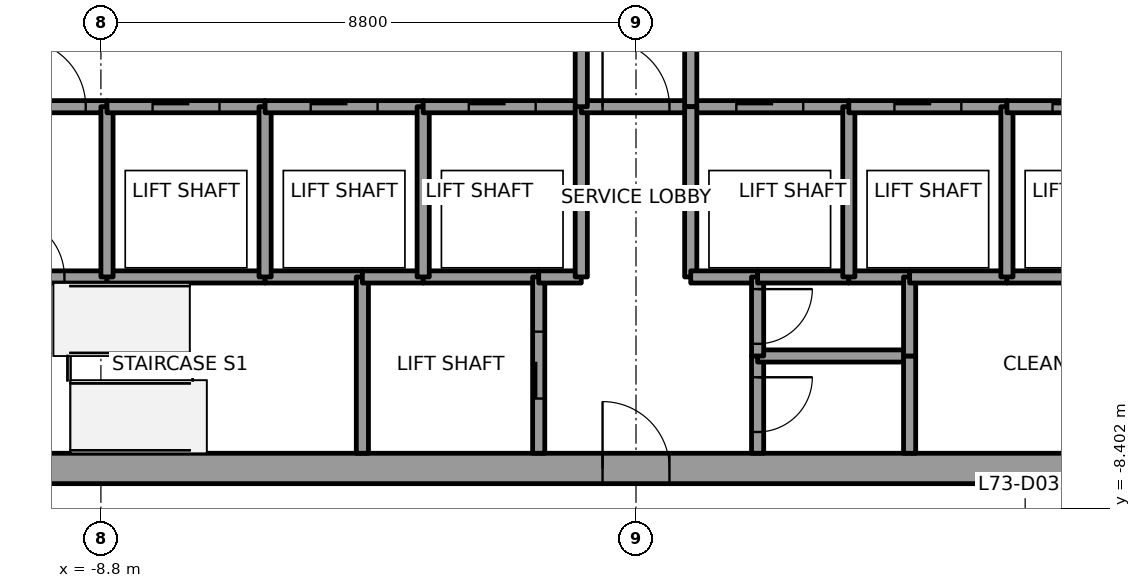
"""IFC4 building model, lengths in metres.
Left out: names, types, materials, properties, quantities, classifications, styles, units other than length and angle.
Written with IfcOpenShell. Run it as: python <this file> out.ifc"""

import sys

from ifc_helpers import new_model, si_unit, direction, frame, frame_2d, origin, place, context, subcontext, project, spatial, rectangle, extrude, element, fill, save


model = new_model("IFC4")
c1 = context("Model", 3, precision=1e-05, world=origin(), true_north=direction((0.0, 1.0)))
c2 = subcontext(c1, "Body", "Model", "MODEL_VIEW")
j1 = project(units=[si_unit("LENGTHUNIT", "METRE"), si_unit("PLANEANGLEUNIT", "RADIAN")], contexts=[c1])
p1 = place(None, origin())
s1 = spatial("IfcSite", under=j1, at=p1, CompositionType="ELEMENT")
p2 = place(p1, origin())
s2 = spatial("IfcBuilding", under=s1, at=p2, CompositionType="ELEMENT")
p3 = place(p2, frame((0.0, 0.0, 319.0)))
s3 = spatial("IfcBuildingStorey", under=s2, at=p3, CompositionType="ELEMENT", Elevation=319.0)
p4 = place(p3, frame((-11.0, -7.75, 0.0), z_axis=(0.0, 0.0, 1.0), x_axis=(1.0, 0.0, 0.0)))
e1 = element("IfcWall", 1, at=p4, inside=s3, PredefinedType="SHEAR", context=c2, shape_type="SweptSolid", body=[
    extrude(rectangle(XDim=22.0, YDim=0.5, at=frame_2d((11.0, 0.0))), origin(), (0.0, 0.0, 1.0), 5.4),
])
p5 = place(p4, frame((10.45, 0.0, 0.0)))
e2 = element("IfcOpeningElement", 2, at=p5, cuts=e1, PredefinedType="OPENING", context=c2, shape_type="SweptSolid", body=[
    extrude(rectangle(XDim=1.1, YDim=2.1, at=frame_2d((0.55, 1.05))), frame((0.0, 0.25, 0.0), z_axis=(0.0, -1.0, 0.0), x_axis=(1.0, 0.0, 0.0)), (0.0, 0.0, 1.0), 0.5),
])
p6 = place(p3, frame((-10.5, -4.6, 0.0), z_axis=(0.0, 0.0, 1.0), x_axis=(1.0, 0.0, 0.0)))
e3 = element("IfcWall", 3, at=p6, inside=s3, PredefinedType="SOLIDWALL", context=c2, shape_type="SweptSolid", body=[
    extrude(rectangle(XDim=1.8, YDim=0.2, at=frame_2d((0.9, 0.0))), origin(), (0.0, 0.0, 1.0), 5.25),
])
p7 = place(p6, frame((0.1, 0.0, 0.0)))
e4 = element("IfcOpeningElement", 4, at=p7, cuts=e3, PredefinedType="OPENING", context=c2, shape_type="SweptSolid", body=[
    extrude(rectangle(XDim=1.0, YDim=2.1, at=frame_2d((0.5, 1.05))), frame((0.0, 0.1, 0.0), z_axis=(0.0, -1.0, 0.0), x_axis=(1.0, 0.0, 0.0)), (0.0, 0.0, 1.0), 0.2),
])
p8 = place(p3, frame((-10.5, -1.8, 0.0), z_axis=(0.0, 0.0, 1.0), x_axis=(1.0, 0.0, 0.0)))
e5 = element("IfcWall", 5, at=p8, inside=s3, PredefinedType="SOLIDWALL", context=c2, shape_type="SweptSolid", body=[
    extrude(rectangle(XDim=1.8, YDim=0.2, at=frame_2d((0.9, 0.0))), origin(), (0.0, 0.0, 1.0), 5.25),
])
p9 = place(p8, frame((0.35, 0.0, 0.0)))
e6 = element("IfcOpeningElement", 6, at=p9, cuts=e5, PredefinedType="OPENING", context=c2, shape_type="SweptSolid", body=[
    extrude(rectangle(XDim=1.1, YDim=2.1, at=frame_2d((0.55, 1.05))), frame((0.0, 0.1, 0.0), z_axis=(0.0, -1.0, 0.0), x_axis=(1.0, 0.0, 0.0)), (0.0, 0.0, 1.0), 0.2),
])
p10 = place(p3, frame((-8.7, -4.6, 0.0), z_axis=(0.0, 0.0, 1.0), x_axis=(1.0, 0.0, 0.0)))
e7 = element("IfcWall", 7, at=p10, inside=s3, PredefinedType="SOLIDWALL", context=c2, shape_type="SweptSolid", body=[
    extrude(rectangle(XDim=2.6, YDim=0.2, at=frame_2d((1.3, 0.0))), origin(), (0.0, 0.0, 1.0), 5.25),
])
p11 = place(p3, frame((-8.7, -4.6, 0.0), z_axis=(0.0, 0.0, 1.0), x_axis=(0.0, 1.0, 0.0)))
e8 = element("IfcWall", 8, at=p11, inside=s3, PredefinedType="SOLIDWALL", context=c2, shape_type="SweptSolid", body=[
    extrude(rectangle(XDim=2.8, YDim=0.2, at=frame_2d((1.4, 0.0))), origin(), (0.0, 0.0, 1.0), 5.25),
])
p12 = place(p3, frame((-8.7, -1.8, 0.0), z_axis=(0.0, 0.0, 1.0), x_axis=(1.0, 0.0, 0.0)))
e9 = element("IfcWall", 9, at=p12, inside=s3, PredefinedType="SOLIDWALL", context=c2, shape_type="SweptSolid", body=[
    extrude(rectangle(XDim=2.6, YDim=0.2, at=frame_2d((1.3, 0.0))), origin(), (0.0, 0.0, 1.0), 5.25),
])
p13 = place(p12, frame((0.75, 0.0, 0.0)))
e10 = element("IfcOpeningElement", 10, at=p13, cuts=e9, PredefinedType="OPENING", context=c2, shape_type="SweptSolid", body=[
    extrude(rectangle(XDim=1.1, YDim=2.1, at=frame_2d((0.55, 1.05))), frame((0.0, 0.1, 0.0), z_axis=(0.0, -1.0, 0.0), x_axis=(1.0, 0.0, 0.0)), (0.0, 0.0, 1.0), 0.2),
])
p14 = place(p3, frame((-6.1, -4.6, 0.0), z_axis=(0.0, 0.0, 1.0), x_axis=(1.0, 0.0, 0.0)))
e11 = element("IfcWall", 11, at=p14, inside=s3, PredefinedType="SOLIDWALL", context=c2, shape_type="SweptSolid", body=[
    extrude(rectangle(XDim=1.6, YDim=0.2, at=frame_2d((0.8, 0.0))), origin(), (0.0, 0.0, 1.0), 5.25),
])
p15 = place(p3, frame((-6.1, -4.6, 0.0), z_axis=(0.0, 0.0, 1.0), x_axis=(0.0, 1.0, 0.0)))
e12 = element("IfcWall", 12, at=p15, inside=s3, PredefinedType="SOLIDWALL", context=c2, shape_type="SweptSolid", body=[
    extrude(rectangle(XDim=2.8, YDim=0.2, at=frame_2d((1.4, 0.0))), origin(), (0.0, 0.0, 1.0), 5.25),
])
p16 = place(p3, frame((-6.1, -1.8, 0.0), z_axis=(0.0, 0.0, 1.0), x_axis=(1.0, 0.0, 0.0)))
e13 = element("IfcWall", 13, at=p16, inside=s3, PredefinedType="SOLIDWALL", context=c2, shape_type="SweptSolid", body=[
    extrude(rectangle(XDim=2.6, YDim=0.2, at=frame_2d((1.3, 0.0))), origin(), (0.0, 0.0, 1.0), 5.25),
])
p17 = place(p16, frame((0.75, 0.0, 0.0)))
e14 = element("IfcOpeningElement", 14, at=p17, cuts=e13, PredefinedType="OPENING", context=c2, shape_type="SweptSolid", body=[
    extrude(rectangle(XDim=1.1, YDim=2.1, at=frame_2d((0.55, 1.05))), frame((0.0, 0.1, 0.0), z_axis=(0.0, -1.0, 0.0), x_axis=(1.0, 0.0, 0.0)), (0.0, 0.0, 1.0), 0.2),
])
p18 = place(p3, frame((-4.5, -4.6, 0.0), z_axis=(0.0, 0.0, 1.0), x_axis=(0.0, -1.0, 0.0)))
e15 = element("IfcWall", 15, at=p18, inside=s3, PredefinedType="SOLIDWALL", context=c2, shape_type="SweptSolid", body=[
    extrude(rectangle(XDim=2.9, YDim=0.2, at=frame_2d((1.45, 0.0))), origin(), (0.0, 0.0, 1.0), 5.25),
])
p19 = place(p3, frame((-4.5, -4.6, 0.0), z_axis=(0.0, 0.0, 1.0), x_axis=(1.0, 0.0, 0.0)))
e16 = element("IfcWall", 16, at=p19, inside=s3, PredefinedType="SOLIDWALL", context=c2, shape_type="SweptSolid", body=[
    extrude(rectangle(XDim=1.0, YDim=0.2, at=frame_2d((0.5, 0.0))), origin(), (0.0, 0.0, 1.0), 5.25),
])
p20 = place(p3, frame((-3.5, -4.6, 0.0), z_axis=(0.0, 0.0, 1.0), x_axis=(1.0, 0.0, 0.0)))
e17 = element("IfcWall", 17, at=p20, inside=s3, PredefinedType="SOLIDWALL", context=c2, shape_type="SweptSolid", body=[
    extrude(rectangle(XDim=1.9, YDim=0.2, at=frame_2d((0.95, 0.0))), origin(), (0.0, 0.0, 1.0), 5.25),
])
p21 = place(p3, frame((-3.5, -4.6, 0.0), z_axis=(0.0, 0.0, 1.0), x_axis=(0.0, 1.0, 0.0)))
e18 = element("IfcWall", 18, at=p21, inside=s3, PredefinedType="SOLIDWALL", context=c2, shape_type="SweptSolid", body=[
    extrude(rectangle(XDim=2.8, YDim=0.2, at=frame_2d((1.4, 0.0))), origin(), (0.0, 0.0, 1.0), 5.25),
])
p22 = place(p3, frame((-3.5, -1.8, 0.0), z_axis=(0.0, 0.0, 1.0), x_axis=(1.0, 0.0, 0.0)))
e19 = element("IfcWall", 19, at=p22, inside=s3, PredefinedType="SOLIDWALL", context=c2, shape_type="SweptSolid", body=[
    extrude(rectangle(XDim=2.6, YDim=0.2, at=frame_2d((1.3, 0.0))), origin(), (0.0, 0.0, 1.0), 5.25),
])
p23 = place(p22, frame((0.75, 0.0, 0.0)))
e20 = element("IfcOpeningElement", 20, at=p23, cuts=e19, PredefinedType="OPENING", context=c2, shape_type="SweptSolid", body=[
    extrude(rectangle(XDim=1.1, YDim=2.1, at=frame_2d((0.55, 1.05))), frame((0.0, 0.1, 0.0), z_axis=(0.0, -1.0, 0.0), x_axis=(1.0, 0.0, 0.0)), (0.0, 0.0, 1.0), 0.2),
])
p24 = place(p3, frame((-1.6, -7.5, 0.0), z_axis=(0.0, 0.0, 1.0), x_axis=(0.0, 1.0, 0.0)))
e21 = element("IfcWall", 21, at=p24, inside=s3, PredefinedType="SOLIDWALL", context=c2, shape_type="SweptSolid", body=[
    extrude(rectangle(XDim=2.9, YDim=0.2, at=frame_2d((1.45, 0.0))), origin(), (0.0, 0.0, 1.0), 5.25),
])
p25 = place(p24, frame((0.9, 0.0, 0.0)))
e22 = element("IfcOpeningElement", 22, at=p25, cuts=e21, PredefinedType="OPENING", context=c2, shape_type="SweptSolid", body=[
    extrude(rectangle(XDim=1.1, YDim=2.1, at=frame_2d((0.55, 1.05))), frame((0.0, 0.1, 0.0), z_axis=(0.0, -1.0, 0.0), x_axis=(1.0, 0.0, 0.0)), (0.0, 0.0, 1.0), 0.2),
])
p26 = place(p3, frame((-1.6, -4.6, 0.0), z_axis=(0.0, 0.0, 1.0), x_axis=(1.0, 0.0, 0.0)))
e23 = element("IfcWall", 23, at=p26, inside=s3, PredefinedType="SOLIDWALL", context=c2, shape_type="SweptSolid", body=[
    extrude(rectangle(XDim=0.7, YDim=0.2, at=frame_2d((0.35, 0.0))), origin(), (0.0, 0.0, 1.0), 5.25),
])
p27 = place(p3, frame((-0.9, -4.6, 0.0), z_axis=(0.0, 0.0, 1.0), x_axis=(0.0, 1.0, 0.0)))
e24 = element("IfcWall", 24, at=p27, inside=s3, PredefinedType="SOLIDWALL", context=c2, shape_type="SweptSolid", body=[
    extrude(rectangle(XDim=2.8, YDim=0.2, at=frame_2d((1.4, 0.0))), origin(), (0.0, 0.0, 1.0), 5.25),
])
p28 = place(p3, frame((-0.9, -1.8, 0.0), z_axis=(0.0, 0.0, 1.0), x_axis=(1.0, 0.0, 0.0)))
e25 = element("IfcWall", 25, at=p28, inside=s3, PredefinedType="SOLIDWALL", context=c2, shape_type="SweptSolid", body=[
    extrude(rectangle(XDim=1.8, YDim=0.2, at=frame_2d((0.9, 0.0))), origin(), (0.0, 0.0, 1.0), 5.25),
])
p29 = place(p28, frame((0.35, 0.0, 0.0)))
e26 = element("IfcOpeningElement", 26, at=p29, cuts=e25, PredefinedType="OPENING", context=c2, shape_type="SweptSolid", body=[
    extrude(rectangle(XDim=1.1, YDim=2.1, at=frame_2d((0.55, 1.05))), frame((0.0, 0.1, 0.0), z_axis=(0.0, -1.0, 0.0), x_axis=(1.0, 0.0, 0.0)), (0.0, 0.0, 1.0), 0.2),
])
p30 = place(p3, frame((-0.9, 1.8, 0.0), z_axis=(0.0, 0.0, 1.0), x_axis=(0.0, -1.0, 0.0)))
e27 = element("IfcWall", 27, at=p30, inside=s3, PredefinedType="SOLIDWALL", context=c2, shape_type="SweptSolid", body=[
    extrude(rectangle(XDim=3.6, YDim=0.2, at=frame_2d((1.8, 0.0))), origin(), (0.0, 0.0, 1.0), 5.25),
])
p31 = place(p30, frame((1.05, 0.0, 0.0)))
e28 = element("IfcOpeningElement", 28, at=p31, cuts=e27, PredefinedType="OPENING", context=c2, shape_type="SweptSolid", body=[
    extrude(rectangle(XDim=1.5, YDim=2.1, at=frame_2d((0.75, 1.05))), frame((0.0, 0.1, 0.0), z_axis=(0.0, -1.0, 0.0), x_axis=(1.0, 0.0, 0.0)), (0.0, 0.0, 1.0), 0.2),
])
p32 = place(p3, frame((0.9, -1.8, 0.0), z_axis=(0.0, 0.0, 1.0), x_axis=(1.0, 0.0, 0.0)))
e29 = element("IfcWall", 29, at=p32, inside=s3, PredefinedType="SOLIDWALL", context=c2, shape_type="SweptSolid", body=[
    extrude(rectangle(XDim=2.6, YDim=0.2, at=frame_2d((1.3, 0.0))), origin(), (0.0, 0.0, 1.0), 5.25),
])
p33 = place(p32, frame((0.75, 0.0, 0.0)))
e30 = element("IfcOpeningElement", 30, at=p33, cuts=e29, PredefinedType="OPENING", context=c2, shape_type="SweptSolid", body=[
    extrude(rectangle(XDim=1.1, YDim=2.1, at=frame_2d((0.55, 1.05))), frame((0.0, 0.1, 0.0), z_axis=(0.0, -1.0, 0.0), x_axis=(1.0, 0.0, 0.0)), (0.0, 0.0, 1.0), 0.2),
])
p34 = place(p3, frame((0.9, -1.8, 0.0), z_axis=(0.0, 0.0, 1.0), x_axis=(0.0, 1.0, 0.0)))
e31 = element("IfcWall", 31, at=p34, inside=s3, PredefinedType="SOLIDWALL", context=c2, shape_type="SweptSolid", body=[
    extrude(rectangle(XDim=3.6, YDim=0.2, at=frame_2d((1.8, 0.0))), origin(), (0.0, 0.0, 1.0), 5.25),
])
p35 = place(p34, frame((1.05, 0.0, 0.0)))
e32 = element("IfcOpeningElement", 32, at=p35, cuts=e31, PredefinedType="OPENING", context=c2, shape_type="SweptSolid", body=[
    extrude(rectangle(XDim=1.5, YDim=2.1, at=frame_2d((0.75, 1.05))), frame((0.0, 0.1, 0.0), z_axis=(0.0, -1.0, 0.0), x_axis=(1.0, 0.0, 0.0)), (0.0, 0.0, 1.0), 0.2),
])
p36 = place(p3, frame((0.9, -1.8, 0.0), z_axis=(0.0, 0.0, 1.0), x_axis=(0.0, -1.0, 0.0)))
e33 = element("IfcWall", 33, at=p36, inside=s3, PredefinedType="SOLIDWALL", context=c2, shape_type="SweptSolid", body=[
    extrude(rectangle(XDim=2.8, YDim=0.2, at=frame_2d((1.4, 0.0))), origin(), (0.0, 0.0, 1.0), 5.25),
])
p37 = place(p3, frame((0.9, -4.6, 0.0), z_axis=(0.0, 0.0, 1.0), x_axis=(1.0, 0.0, 0.0)))
e34 = element("IfcWall", 34, at=p37, inside=s3, PredefinedType="SOLIDWALL", context=c2, shape_type="SweptSolid", body=[
    extrude(rectangle(XDim=1.1, YDim=0.2, at=frame_2d((0.55, 0.0))), origin(), (0.0, 0.0, 1.0), 5.25),
])
p38 = place(p3, frame((2.0, -5.9, 0.0), z_axis=(0.0, 0.0, 1.0), x_axis=(0.0, -1.0, 0.0)))
e35 = element("IfcWall", 35, at=p38, inside=s3, PredefinedType="SOLIDWALL", context=c2, shape_type="SweptSolid", body=[
    extrude(rectangle(XDim=1.6, YDim=0.2, at=frame_2d((0.8, 0.0))), origin(), (0.0, 0.0, 1.0), 5.25),
])
p39 = place(p38, frame((0.35, 0.0, 0.0)))
e36 = element("IfcOpeningElement", 36, at=p39, cuts=e35, PredefinedType="OPENING", context=c2, shape_type="SweptSolid", body=[
    extrude(rectangle(XDim=0.9, YDim=2.1, at=frame_2d((0.45, 1.05))), frame((0.0, 0.1, 0.0), z_axis=(0.0, -1.0, 0.0), x_axis=(1.0, 0.0, 0.0)), (0.0, 0.0, 1.0), 0.2),
])
p40 = place(p3, frame((4.5, -5.9, 0.0), z_axis=(0.0, 0.0, 1.0), x_axis=(-1.0, 0.0, 0.0)))
e37 = element("IfcWall", 37, at=p40, inside=s3, PredefinedType="SOLIDWALL", context=c2, shape_type="SweptSolid", body=[
    extrude(rectangle(XDim=2.5, YDim=0.2, at=frame_2d((1.25, 0.0))), origin(), (0.0, 0.0, 1.0), 5.25),
])
p41 = place(p3, frame((2.0, -4.6, 0.0), z_axis=(0.0, 0.0, 1.0), x_axis=(0.0, -1.0, 0.0)))
e38 = element("IfcWall", 38, at=p41, inside=s3, PredefinedType="SOLIDWALL", context=c2, shape_type="SweptSolid", body=[
    extrude(rectangle(XDim=1.3, YDim=0.2, at=frame_2d((0.65, 0.0))), origin(), (0.0, 0.0, 1.0), 5.25),
])
p42 = place(p41, frame((0.2, 0.0, 0.0)))
e39 = element("IfcOpeningElement", 39, at=p42, cuts=e38, PredefinedType="OPENING", context=c2, shape_type="SweptSolid", body=[
    extrude(rectangle(XDim=0.9, YDim=2.1, at=frame_2d((0.45, 1.05))), frame((0.0, 0.1, 0.0), z_axis=(0.0, -1.0, 0.0), x_axis=(1.0, 0.0, 0.0)), (0.0, 0.0, 1.0), 0.2),
])
p43 = place(p3, frame((3.5, -4.6, 0.0), z_axis=(0.0, 0.0, 1.0), x_axis=(-1.0, 0.0, 0.0)))
e40 = element("IfcWall", 40, at=p43, inside=s3, PredefinedType="SOLIDWALL", context=c2, shape_type="SweptSolid", body=[
    extrude(rectangle(XDim=1.5, YDim=0.2, at=frame_2d((0.75, 0.0))), origin(), (0.0, 0.0, 1.0), 5.25),
])
p44 = place(p3, frame((4.5, -4.6, 0.0), z_axis=(0.0, 0.0, 1.0), x_axis=(-1.0, 0.0, 0.0)))
e41 = element("IfcWall", 41, at=p44, inside=s3, PredefinedType="SOLIDWALL", context=c2, shape_type="SweptSolid", body=[
    extrude(rectangle(XDim=1.0, YDim=0.2, at=frame_2d((0.5, 0.0))), origin(), (0.0, 0.0, 1.0), 5.25),
])
p45 = place(p3, frame((3.5, -4.6, 0.0), z_axis=(0.0, 0.0, 1.0), x_axis=(0.0, 1.0, 0.0)))
e42 = element("IfcWall", 42, at=p45, inside=s3, PredefinedType="SOLIDWALL", context=c2, shape_type="SweptSolid", body=[
    extrude(rectangle(XDim=2.8, YDim=0.2, at=frame_2d((1.4, 0.0))), origin(), (0.0, 0.0, 1.0), 5.25),
])
p46 = place(p3, frame((3.5, -1.8, 0.0), z_axis=(0.0, 0.0, 1.0), x_axis=(1.0, 0.0, 0.0)))
e43 = element("IfcWall", 43, at=p46, inside=s3, PredefinedType="SOLIDWALL", context=c2, shape_type="SweptSolid", body=[
    extrude(rectangle(XDim=2.6, YDim=0.2, at=frame_2d((1.3, 0.0))), origin(), (0.0, 0.0, 1.0), 5.25),
])
p47 = place(p46, frame((0.75, 0.0, 0.0)))
e44 = element("IfcOpeningElement", 44, at=p47, cuts=e43, PredefinedType="OPENING", context=c2, shape_type="SweptSolid", body=[
    extrude(rectangle(XDim=1.1, YDim=2.1, at=frame_2d((0.55, 1.05))), frame((0.0, 0.1, 0.0), z_axis=(0.0, -1.0, 0.0), x_axis=(1.0, 0.0, 0.0)), (0.0, 0.0, 1.0), 0.2),
])
p48 = place(p3, frame((4.5, -5.9, 0.0), z_axis=(0.0, 0.0, 1.0), x_axis=(0.0, -1.0, 0.0)))
e45 = element("IfcWall", 45, at=p48, inside=s3, PredefinedType="SOLIDWALL", context=c2, shape_type="SweptSolid", body=[
    extrude(rectangle(XDim=1.6, YDim=0.2, at=frame_2d((0.8, 0.0))), origin(), (0.0, 0.0, 1.0), 5.25),
])
p49 = place(p3, frame((4.5, -4.6, 0.0), z_axis=(0.0, 0.0, 1.0), x_axis=(0.0, -1.0, 0.0)))
e46 = element("IfcWall", 46, at=p49, inside=s3, PredefinedType="SOLIDWALL", context=c2, shape_type="SweptSolid", body=[
    extrude(rectangle(XDim=1.3, YDim=0.2, at=frame_2d((0.65, 0.0))), origin(), (0.0, 0.0, 1.0), 5.25),
])
p50 = place(p3, frame((6.1, -4.6, 0.0), z_axis=(0.0, 0.0, 1.0), x_axis=(-1.0, 0.0, 0.0)))
e47 = element("IfcWall", 47, at=p50, inside=s3, PredefinedType="SOLIDWALL", context=c2, shape_type="SweptSolid", body=[
    extrude(rectangle(XDim=1.6, YDim=0.2, at=frame_2d((0.8, 0.0))), origin(), (0.0, 0.0, 1.0), 5.25),
])
p51 = place(p3, frame((8.7, -4.6, 0.0), z_axis=(0.0, 0.0, 1.0), x_axis=(-1.0, 0.0, 0.0)))
e48 = element("IfcWall", 48, at=p51, inside=s3, PredefinedType="SOLIDWALL", context=c2, shape_type="SweptSolid", body=[
    extrude(rectangle(XDim=2.6, YDim=0.2, at=frame_2d((1.3, 0.0))), origin(), (0.0, 0.0, 1.0), 5.25),
])
p52 = place(p3, frame((6.1, -4.6, 0.0), z_axis=(0.0, 0.0, 1.0), x_axis=(0.0, 1.0, 0.0)))
e49 = element("IfcWall", 49, at=p52, inside=s3, PredefinedType="SOLIDWALL", context=c2, shape_type="SweptSolid", body=[
    extrude(rectangle(XDim=2.8, YDim=0.2, at=frame_2d((1.4, 0.0))), origin(), (0.0, 0.0, 1.0), 5.25),
])
p53 = place(p3, frame((6.1, -1.8, 0.0), z_axis=(0.0, 0.0, 1.0), x_axis=(1.0, 0.0, 0.0)))
e50 = element("IfcWall", 50, at=p53, inside=s3, PredefinedType="SOLIDWALL", context=c2, shape_type="SweptSolid", body=[
    extrude(rectangle(XDim=2.6, YDim=0.2, at=frame_2d((1.3, 0.0))), origin(), (0.0, 0.0, 1.0), 5.25),
])
p54 = place(p53, frame((0.75, 0.0, 0.0)))
e51 = element("IfcOpeningElement", 51, at=p54, cuts=e50, PredefinedType="OPENING", context=c2, shape_type="SweptSolid", body=[
    extrude(rectangle(XDim=1.1, YDim=2.1, at=frame_2d((0.55, 1.05))), frame((0.0, 0.1, 0.0), z_axis=(0.0, -1.0, 0.0), x_axis=(1.0, 0.0, 0.0)), (0.0, 0.0, 1.0), 0.2),
])
p55 = place(p13, origin())
e52 = element("IfcDoor", 52, at=p55, inside=s3, OperationType="SLIDING_TO_LEFT", PredefinedType="DOOR", context=c2, shape_type="SweptSolid", body=[
    extrude(rectangle(XDim=1.1, YDim=2.1, at=frame_2d((0.55, 1.05))), frame((0.0, 0.025, 0.0), z_axis=(0.0, -1.0, 0.0), x_axis=(1.0, 0.0, 0.0)), (0.0, 0.0, 1.0), 0.05),
])
fill(e10, e52)
p56 = place(p17, origin())
e53 = element("IfcDoor", 53, at=p56, inside=s3, OperationType="SLIDING_TO_RIGHT", PredefinedType="DOOR", context=c2, shape_type="SweptSolid", body=[
    extrude(rectangle(XDim=1.1, YDim=2.1, at=frame_2d((0.55, 1.05))), frame((0.0, 0.025, 0.0), z_axis=(0.0, -1.0, 0.0), x_axis=(1.0, 0.0, 0.0)), (0.0, 0.0, 1.0), 0.05),
])
fill(e14, e53)
p57 = place(p23, origin())
e54 = element("IfcDoor", 54, at=p57, inside=s3, OperationType="SLIDING_TO_LEFT", PredefinedType="DOOR", context=c2, shape_type="SweptSolid", body=[
    extrude(rectangle(XDim=1.1, YDim=2.1, at=frame_2d((0.55, 1.05))), frame((0.0, 0.025, 0.0), z_axis=(0.0, -1.0, 0.0), x_axis=(1.0, 0.0, 0.0)), (0.0, 0.0, 1.0), 0.05),
])
fill(e20, e54)
p58 = place(p33, origin())
e55 = element("IfcDoor", 55, at=p58, inside=s3, OperationType="SLIDING_TO_RIGHT", PredefinedType="DOOR", context=c2, shape_type="SweptSolid", body=[
    extrude(rectangle(XDim=1.1, YDim=2.1, at=frame_2d((0.55, 1.05))), frame((0.0, 0.025, 0.0), z_axis=(0.0, -1.0, 0.0), x_axis=(1.0, 0.0, 0.0)), (0.0, 0.0, 1.0), 0.05),
])
fill(e30, e55)
p59 = place(p47, origin())
e56 = element("IfcDoor", 56, at=p59, inside=s3, OperationType="SLIDING_TO_RIGHT", PredefinedType="DOOR", context=c2, shape_type="SweptSolid", body=[
    extrude(rectangle(XDim=1.1, YDim=2.1, at=frame_2d((0.55, 1.05))), frame((0.0, 0.025, 0.0), z_axis=(0.0, -1.0, 0.0), x_axis=(1.0, 0.0, 0.0)), (0.0, 0.0, 1.0), 0.05),
])
fill(e44, e56)
p60 = place(p54, origin())
e57 = element("IfcDoor", 57, at=p60, inside=s3, OperationType="SLIDING_TO_LEFT", PredefinedType="DOOR", context=c2, shape_type="SweptSolid", body=[
    extrude(rectangle(XDim=1.1, YDim=2.1, at=frame_2d((0.55, 1.05))), frame((0.0, 0.025, 0.0), z_axis=(0.0, -1.0, 0.0), x_axis=(1.0, 0.0, 0.0)), (0.0, 0.0, 1.0), 0.05),
])
fill(e51, e57)
p61 = place(p25, origin())
e58 = element("IfcDoor", 58, at=p61, inside=s3, OperationType="SLIDING_TO_LEFT", PredefinedType="DOOR", context=c2, shape_type="SweptSolid", body=[
    extrude(rectangle(XDim=1.1, YDim=2.1, at=frame_2d((0.55, 1.05))), frame((0.0, 0.025, 0.0), z_axis=(0.0, -1.0, 0.0), x_axis=(1.0, 0.0, 0.0)), (0.0, 0.0, 1.0), 0.05),
])
fill(e22, e58)
p62 = place(p9, origin())
e59 = element("IfcDoor", 59, at=p62, inside=s3, OperationType="SINGLE_SWING_RIGHT", PredefinedType="DOOR", context=c2, shape_type="SweptSolid", body=[
    extrude(rectangle(XDim=1.1, YDim=2.1, at=frame_2d((0.55, 1.05))), frame((0.0, 0.025, 0.0), z_axis=(0.0, -1.0, 0.0), x_axis=(1.0, 0.0, 0.0)), (0.0, 0.0, 1.0), 0.05),
])
fill(e6, e59)
p63 = place(p29, origin())
e60 = element("IfcDoor", 60, at=p63, inside=s3, OperationType="SINGLE_SWING_LEFT", PredefinedType="DOOR", context=c2, shape_type="SweptSolid", body=[
    extrude(rectangle(XDim=1.1, YDim=2.1, at=frame_2d((0.55, 1.05))), frame((0.0, 0.025, 0.0), z_axis=(0.0, -1.0, 0.0), x_axis=(1.0, 0.0, 0.0)), (0.0, 0.0, 1.0), 0.05),
])
fill(e26, e60)
p64 = place(p7, origin())
e61 = element("IfcDoor", 61, at=p64, inside=s3, OperationType="SINGLE_SWING_LEFT", PredefinedType="DOOR", context=c2, shape_type="SweptSolid", body=[
    extrude(rectangle(XDim=1.0, YDim=2.1, at=frame_2d((0.5, 1.05))), frame((0.0, 0.025, 0.0), z_axis=(0.0, -1.0, 0.0), x_axis=(1.0, 0.0, 0.0)), (0.0, 0.0, 1.0), 0.05),
])
fill(e4, e61)
p65 = place(p39, origin())
e62 = element("IfcDoor", 62, at=p65, inside=s3, OperationType="SINGLE_SWING_RIGHT", PredefinedType="DOOR", context=c2, shape_type="SweptSolid", body=[
    extrude(rectangle(XDim=0.9, YDim=2.1, at=frame_2d((0.45, 1.05))), frame((0.0, 0.025, 0.0), z_axis=(0.0, -1.0, 0.0), x_axis=(1.0, 0.0, 0.0)), (0.0, 0.0, 1.0), 0.05),
])
fill(e36, e62)
p66 = place(p42, origin())
e63 = element("IfcDoor", 63, at=p66, inside=s3, OperationType="SINGLE_SWING_RIGHT", PredefinedType="DOOR", context=c2, shape_type="SweptSolid", body=[
    extrude(rectangle(XDim=0.9, YDim=2.1, at=frame_2d((0.45, 1.05))), frame((0.0, 0.025, 0.0), z_axis=(0.0, -1.0, 0.0), x_axis=(1.0, 0.0, 0.0)), (0.0, 0.0, 1.0), 0.05),
])
fill(e39, e63)
p67 = place(p5, origin())
e64 = element("IfcDoor", 64, at=p67, inside=s3, OperationType="SINGLE_SWING_RIGHT", PredefinedType="DOOR", context=c2, shape_type="SweptSolid", body=[
    extrude(rectangle(XDim=1.1, YDim=2.1, at=frame_2d((0.55, 1.05))), frame((0.0, 0.025, 0.0), z_axis=(0.0, -1.0, 0.0), x_axis=(1.0, 0.0, 0.0)), (0.0, 0.0, 1.0), 0.05),
])
fill(e2, e64)
save(model, sys.argv[1])
